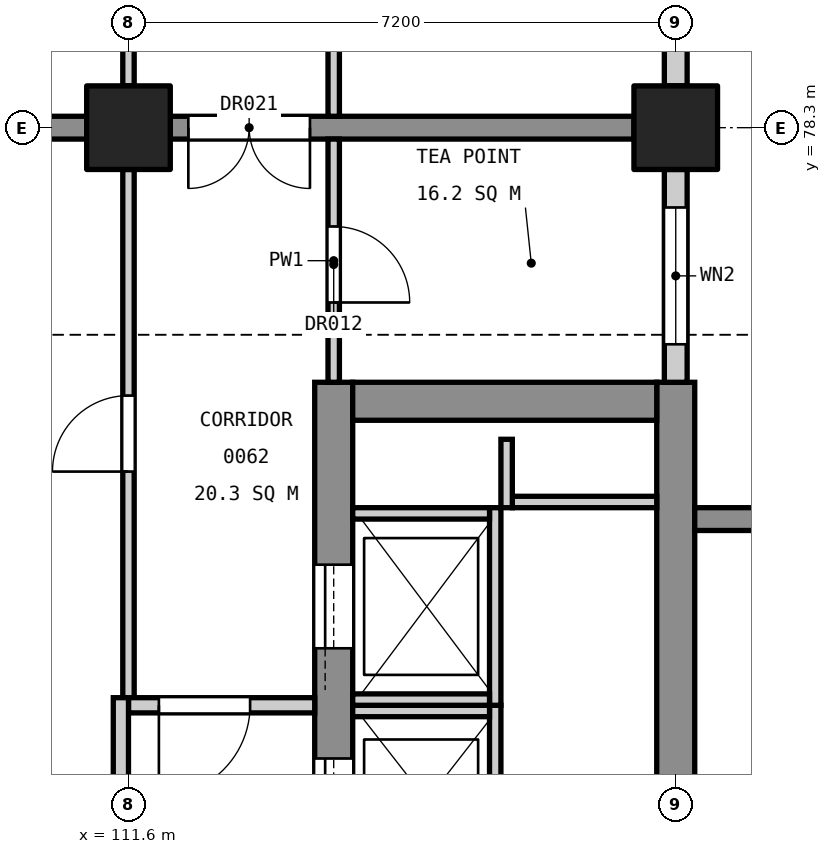
"""IFC4 building model, lengths in metres.
Left out: names, types, materials, properties, quantities, classifications, styles, units other than length and angle.
Written with IfcOpenShell. Run it as: python <this file> out.ifc"""

import sys

from ifc_helpers import new_model, si_unit, direction, frame, frame_2d, origin, origin_2d, place, context, subcontext, project, spatial, rectangle, extrude, element, fill, save


model = new_model("IFC4")
c1 = context("Model", 3, precision=1e-05, world=origin(), true_north=direction((0.0, 1.0)))
c2 = subcontext(c1, "Body", "Model", "MODEL_VIEW")
j1 = project(units=[si_unit("LENGTHUNIT", "METRE"), si_unit("PLANEANGLEUNIT", "RADIAN")], contexts=[c1])
p1 = place(None, origin())
s1 = spatial("IfcSite", under=j1, at=p1, CompositionType="ELEMENT")
p2 = place(p1, origin())
s2 = spatial("IfcBuilding", under=s1, at=p2, CompositionType="ELEMENT")
p3 = place(p2, origin())
s3 = spatial("IfcBuildingStorey", under=s2, at=p3, CompositionType="ELEMENT", Elevation=0.0)
for number, where, z_axis, x_axis in (
    (1, (118.8, 78.3, 0.0), (0.0, 0.0, 1.0), (1.0, 0.0, 0.0)),
    (2, (111.6, 78.3, 0.0), (0.0, 0.0, 1.0), (1.0, 0.0, 0.0)),
):
    element("IfcColumn", number, at=place(p3, frame(where, z_axis=z_axis, x_axis=x_axis)), inside=s3, PredefinedType="COLUMN", context=c2, shape_type="SweptSolid", body=[
        extrude(rectangle(XDim=1.1, YDim=1.1, at=origin_2d()), origin(), (0.0, 0.0, 1.0), 6.0),
    ])
p4 = place(p3, frame((118.8, 60.05, 0.0), z_axis=(0.0, 0.0, 1.0), x_axis=(0.0, 1.0, 0.0)))
e3 = element("IfcWall", 3, at=p4, inside=s3, PredefinedType="SHEAR", context=c2, shape_type="SweptSolid", body=[
    extrude(rectangle(XDim=14.9, YDim=0.5, at=frame_2d((7.45, 0.0))), origin(), (0.0, 0.0, 1.0), 5.7),
])
p5 = place(p4, frame((0.55, 0.0, 0.0)))
e4 = element("IfcOpeningElement", 4, at=p5, cuts=e3, PredefinedType="OPENING", context=c2, shape_type="SweptSolid", body=[
    extrude(rectangle(XDim=1.4, YDim=2.1, at=frame_2d((0.7, 1.05))), frame((0.0, 0.26, 0.0), z_axis=(0.0, -1.0, 0.0), x_axis=(1.0, 0.0, 0.0)), (0.0, 0.0, 1.0), 0.52),
])
p6 = place(p4, frame((6.58, 0.0, 3.4)))
e5 = element("IfcOpeningElement", 5, at=p6, cuts=e3, PredefinedType="OPENING", context=c2, shape_type="SweptSolid", body=[
    extrude(rectangle(XDim=1.2, YDim=0.9, at=frame_2d((0.6, 0.45))), frame((0.0, 0.26, 0.0), z_axis=(0.0, -1.0, 0.0), x_axis=(1.0, 0.0, 0.0)), (0.0, 0.0, 1.0), 0.52),
])
p7 = place(p3, frame((114.3, 60.05, 0.0), z_axis=(0.0, 0.0, 1.0), x_axis=(0.0, 1.0, 0.0)))
e6 = element("IfcWall", 6, at=p7, inside=s3, PredefinedType="SHEAR", context=c2, shape_type="SweptSolid", body=[
    extrude(rectangle(XDim=14.9, YDim=0.5, at=frame_2d((7.45, 0.0))), origin(), (0.0, 0.0, 1.0), 5.7),
])
p8 = place(p7, frame((0.55, 0.0, 0.0)))
e7 = element("IfcOpeningElement", 7, at=p8, cuts=e6, PredefinedType="OPENING", context=c2, shape_type="SweptSolid", body=[
    extrude(rectangle(XDim=1.4, YDim=2.1, at=frame_2d((0.7, 1.05))), frame((0.0, 0.26, 0.0), z_axis=(0.0, -1.0, 0.0), x_axis=(1.0, 0.0, 0.0)), (0.0, 0.0, 1.0), 0.52),
])
p9 = place(p7, frame((8.85, 0.0, 0.0)))
e8 = element("IfcOpeningElement", 8, at=p9, cuts=e6, PredefinedType="OPENING", context=c2, shape_type="SweptSolid", body=[
    extrude(rectangle(XDim=1.1, YDim=2.1, at=frame_2d((0.55, 1.05))), frame((0.0, 0.26, 0.0), z_axis=(0.0, -1.0, 0.0), x_axis=(1.0, 0.0, 0.0)), (0.0, 0.0, 1.0), 0.52),
])
p10 = place(p7, frame((11.4, 0.0, 0.0)))
e9 = element("IfcOpeningElement", 9, at=p10, cuts=e6, PredefinedType="OPENING", context=c2, shape_type="SweptSolid", body=[
    extrude(rectangle(XDim=1.1, YDim=2.1, at=frame_2d((0.55, 1.05))), frame((0.0, 0.26, 0.0), z_axis=(0.0, -1.0, 0.0), x_axis=(1.0, 0.0, 0.0)), (0.0, 0.0, 1.0), 0.52),
])
p11 = place(p3, frame((118.55, 74.7, 0.0), z_axis=(0.0, 0.0, 1.0), x_axis=(-1.0, 0.0, 0.0)))
e10 = element("IfcWall", 10, at=p11, inside=s3, PredefinedType="SHEAR", context=c2, shape_type="SweptSolid", body=[
    extrude(rectangle(XDim=4.0, YDim=0.5, at=frame_2d((2.0, 0.0))), origin(), (0.0, 0.0, 1.0), 5.7),
])
p12 = place(p3, frame((119.05, 73.15, 0.0), z_axis=(0.0, 0.0, 1.0), x_axis=(1.0, 0.0, 0.0)))
e11 = element("IfcWall", 11, at=p12, inside=s3, PredefinedType="SHEAR", context=c2, shape_type="SweptSolid", body=[
    extrude(rectangle(XDim=1.25, YDim=0.3, at=frame_2d((0.625, 0.0))), origin(), (0.0, 0.0, 1.0), 6.0),
])
p13 = place(p3, frame((118.25, 78.3, 0.0), z_axis=(0.0, 0.0, 1.0), x_axis=(-1.0, 0.0, 0.0)))
e12 = element("IfcWall", 12, at=p13, inside=s3, PredefinedType="SHEAR", context=c2, shape_type="SweptSolid", body=[
    extrude(rectangle(XDim=6.1, YDim=0.3, at=frame_2d((3.05, 0.0))), origin(), (0.0, 0.0, 1.0), 5.7),
])
p14 = place(p13, frame((4.262, 0.0, 0.0)))
e13 = element("IfcOpeningElement", 13, at=p14, cuts=e12, PredefinedType="OPENING", context=c2, shape_type="SweptSolid", body=[
    extrude(rectangle(XDim=1.6, YDim=2.1, at=frame_2d((0.8, 1.05))), frame((0.0, 0.16, 0.0), z_axis=(0.0, -1.0, 0.0), x_axis=(1.0, 0.0, 0.0)), (0.0, 0.0, 1.0), 0.32),
])
p15 = place(p3, frame((111.05, 78.3, 0.0), z_axis=(0.0, 0.0, 1.0), x_axis=(-1.0, 0.0, 0.0)))
e14 = element("IfcWall", 14, at=p15, inside=s3, PredefinedType="SHEAR", context=c2, shape_type="SweptSolid", body=[
    extrude(rectangle(XDim=9.7, YDim=0.3, at=frame_2d((4.85, 0.0))), origin(), (0.0, 0.0, 1.0), 5.7),
])
p16 = place(p3, frame((116.425, 68.2, 0.0), z_axis=(0.0, 0.0, 1.0), x_axis=(0.0, 1.0, 0.0)))
e15 = element("IfcWall", 15, at=p16, inside=s3, PredefinedType="SOLIDWALL", context=c2, shape_type="SweptSolid", body=[
    extrude(rectangle(XDim=2.5, YDim=0.15, at=frame_2d((1.25, 0.0))), origin(), (0.0, 0.0, 1.0), 6.0),
])
p17 = place(p3, frame((116.35, 70.625, 0.0), z_axis=(0.0, 0.0, 1.0), x_axis=(-1.0, 0.0, 0.0)))
e16 = element("IfcWall", 16, at=p17, inside=s3, PredefinedType="SOLIDWALL", context=c2, shape_type="SweptSolid", body=[
    extrude(rectangle(XDim=1.8, YDim=0.15, at=frame_2d((0.9, 0.0))), origin(), (0.0, 0.0, 1.0), 6.0),
])
p18 = place(p3, frame((116.425, 70.7, 0.0), z_axis=(0.0, 0.0, 1.0), x_axis=(0.0, 1.0, 0.0)))
e17 = element("IfcWall", 17, at=p18, inside=s3, PredefinedType="SOLIDWALL", context=c2, shape_type="SweptSolid", body=[
    extrude(rectangle(XDim=2.6, YDim=0.15, at=frame_2d((1.3, 0.0))), origin(), (0.0, 0.0, 1.0), 6.0),
])
for number, where, z_axis, x_axis in (
    (18, (116.35, 70.775, 0.0), (0.0, 0.0, 1.0), (-1.0, 0.0, 0.0)),
    (19, (116.35, 73.225, 0.0), (0.0, 0.0, 1.0), (-1.0, 0.0, 0.0)),
):
    element("IfcWall", number, at=place(p3, frame(where, z_axis=z_axis, x_axis=x_axis)), inside=s3, PredefinedType="SOLIDWALL", context=c2, shape_type="SweptSolid", body=[
        extrude(rectangle(XDim=1.8, YDim=0.15, at=frame_2d((0.9, 0.0))), origin(), (0.0, 0.0, 1.0), 6.0),
    ])
p19 = place(p3, frame((118.55, 73.375, 0.0), z_axis=(0.0, 0.0, 1.0), x_axis=(-1.0, 0.0, 0.0)))
e20 = element("IfcWall", 20, at=p19, inside=s3, PredefinedType="SOLIDWALL", context=c2, shape_type="SweptSolid", body=[
    extrude(rectangle(XDim=1.9, YDim=0.15, at=frame_2d((0.95, 0.0))), origin(), (0.0, 0.0, 1.0), 6.0),
])
p20 = place(p3, frame((116.575, 73.3, 0.0), z_axis=(0.0, 0.0, 1.0), x_axis=(0.0, 1.0, 0.0)))
e21 = element("IfcWall", 21, at=p20, inside=s3, PredefinedType="SOLIDWALL", context=c2, shape_type="SweptSolid", body=[
    extrude(rectangle(XDim=0.9, YDim=0.15, at=frame_2d((0.45, 0.0))), origin(), (0.0, 0.0, 1.0), 6.0),
])
p21 = place(p3, frame((118.8, 74.95, 0.0), z_axis=(0.0, 0.0, 1.0), x_axis=(0.0, 1.0, 0.0)))
e22 = element("IfcWall", 22, at=p21, inside=s3, PredefinedType="STANDARD", context=c2, shape_type="SweptSolid", body=[
    extrude(rectangle(XDim=2.8, YDim=0.3, at=frame_2d((1.4, 0.0))), origin(), (0.0, 0.0, 1.0), 4.7),
])
p22 = place(p21, frame((0.5, 0.0, 0.9)))
e23 = element("IfcOpeningElement", 23, at=p22, cuts=e22, PredefinedType="OPENING", context=c2, shape_type="SweptSolid", body=[
    extrude(rectangle(XDim=1.8, YDim=3.0, at=frame_2d((0.9, 1.5))), frame((0.0, 0.16, 0.0), z_axis=(0.0, -1.0, 0.0), x_axis=(1.0, 0.0, 0.0)), (0.0, 0.0, 1.0), 0.32),
])
p23 = place(p3, frame((118.8, 78.85, 0.0), z_axis=(0.0, 0.0, 1.0), x_axis=(0.0, 1.0, 0.0)))
e24 = element("IfcWall", 24, at=p23, inside=s3, PredefinedType="STANDARD", context=c2, shape_type="SweptSolid", body=[
    extrude(rectangle(XDim=10.0, YDim=0.3, at=frame_2d((5.0, 0.0))), origin(), (0.0, 0.0, 1.0), 4.7),
])
p24 = place(p23, frame((0.625, 0.0, 0.9)))
e25 = element("IfcOpeningElement", 25, at=p24, cuts=e24, PredefinedType="OPENING", context=c2, shape_type="SweptSolid", body=[
    extrude(rectangle(XDim=1.8, YDim=3.0, at=frame_2d((0.9, 1.5))), frame((0.0, 0.16, 0.0), z_axis=(0.0, -1.0, 0.0), x_axis=(1.0, 0.0, 0.0)), (0.0, 0.0, 1.0), 0.32),
])
p25 = place(p23, frame((3.95, 0.0, 0.9)))
e26 = element("IfcOpeningElement", 26, at=p25, cuts=e24, PredefinedType="OPENING", context=c2, shape_type="SweptSolid", body=[
    extrude(rectangle(XDim=1.8, YDim=3.0, at=frame_2d((0.9, 1.5))), frame((0.0, 0.16, 0.0), z_axis=(0.0, -1.0, 0.0), x_axis=(1.0, 0.0, 0.0)), (0.0, 0.0, 1.0), 0.32),
])
p26 = place(p23, frame((7.425, 0.0, 0.9)))
e27 = element("IfcOpeningElement", 27, at=p26, cuts=e24, PredefinedType="OPENING", context=c2, shape_type="SweptSolid", body=[
    extrude(rectangle(XDim=1.8, YDim=3.0, at=frame_2d((0.9, 1.5))), frame((0.0, 0.16, 0.0), z_axis=(0.0, -1.0, 0.0), x_axis=(1.0, 0.0, 0.0)), (0.0, 0.0, 1.0), 0.32),
])
p27 = place(p3, frame((114.3, 74.95, 0.0), z_axis=(0.0, 0.0, 1.0), x_axis=(0.0, 1.0, 0.0)))
e28 = element("IfcWall", 28, at=p27, inside=s3, PredefinedType="PARTITIONING", context=c2, shape_type="SweptSolid", body=[
    extrude(rectangle(XDim=3.2, YDim=0.15, at=frame_2d((1.6, 0.0))), origin(), (0.0, 0.0, 1.0), 4.6),
])
p28 = place(p27, frame((1.05, 0.0, 0.0)))
e29 = element("IfcOpeningElement", 29, at=p28, cuts=e28, PredefinedType="OPENING", context=c2, shape_type="SweptSolid", body=[
    extrude(rectangle(XDim=1.0, YDim=2.1, at=frame_2d((0.5, 1.05))), frame((0.0, 0.085, 0.0), z_axis=(0.0, -1.0, 0.0), x_axis=(1.0, 0.0, 0.0)), (0.0, 0.0, 1.0), 0.17),
])
p29 = place(p3, frame((114.3, 78.45, 0.0), z_axis=(0.0, 0.0, 1.0), x_axis=(0.0, 1.0, 0.0)))
e30 = element("IfcWall", 30, at=p29, inside=s3, PredefinedType="PARTITIONING", context=c2, shape_type="SweptSolid", body=[
    extrude(rectangle(XDim=10.4, YDim=0.15, at=frame_2d((5.2, 0.0))), origin(), (0.0, 0.0, 1.0), 4.6),
])
p30 = place(p29, frame((4.65, 0.0, 0.0)))
e31 = element("IfcOpeningElement", 31, at=p30, cuts=e30, PredefinedType="OPENING", context=c2, shape_type="SweptSolid", body=[
    extrude(rectangle(XDim=1.2, YDim=2.1, at=frame_2d((0.6, 1.05))), frame((0.0, 0.085, 0.0), z_axis=(0.0, -1.0, 0.0), x_axis=(1.0, 0.0, 0.0)), (0.0, 0.0, 1.0), 0.17),
])
p31 = place(p3, frame((111.6, 70.8, 0.0), z_axis=(0.0, 0.0, 1.0), x_axis=(0.0, 1.0, 0.0)))
e32 = element("IfcWall", 32, at=p31, inside=s3, PredefinedType="PARTITIONING", context=c2, shape_type="SweptSolid", body=[
    extrude(rectangle(XDim=6.95, YDim=0.15, at=frame_2d((3.475, 0.0))), origin(), (0.0, 0.0, 1.0), 4.6),
])
p32 = place(p31, frame((2.975, 0.0, 0.0)))
e33 = element("IfcOpeningElement", 33, at=p32, cuts=e32, PredefinedType="OPENING", context=c2, shape_type="SweptSolid", body=[
    extrude(rectangle(XDim=1.0, YDim=2.1, at=frame_2d((0.5, 1.05))), frame((0.0, 0.085, 0.0), z_axis=(0.0, -1.0, 0.0), x_axis=(1.0, 0.0, 0.0)), (0.0, 0.0, 1.0), 0.17),
])
p33 = place(p3, frame((111.6, 78.85, 0.0), z_axis=(0.0, 0.0, 1.0), x_axis=(0.0, 1.0, 0.0)))
e34 = element("IfcWall", 34, at=p33, inside=s3, PredefinedType="PARTITIONING", context=c2, shape_type="SweptSolid", body=[
    extrude(rectangle(XDim=9.7, YDim=0.15, at=frame_2d((4.85, 0.0))), origin(), (0.0, 0.0, 1.0), 4.6),
])
p34 = place(p33, frame((2.725, 0.0, 0.0)))
e35 = element("IfcOpeningElement", 35, at=p34, cuts=e34, PredefinedType="OPENING", context=c2, shape_type="SweptSolid", body=[
    extrude(rectangle(XDim=1.2, YDim=2.1, at=frame_2d((0.6, 1.05))), frame((0.0, 0.085, 0.0), z_axis=(0.0, -1.0, 0.0), x_axis=(1.0, 0.0, 0.0)), (0.0, 0.0, 1.0), 0.17),
])
p35 = place(p33, frame((7.575, 0.0, 0.0)))
e36 = element("IfcOpeningElement", 36, at=p35, cuts=e34, PredefinedType="OPENING", context=c2, shape_type="SweptSolid", body=[
    extrude(rectangle(XDim=1.2, YDim=2.1, at=frame_2d((0.6, 1.05))), frame((0.0, 0.085, 0.0), z_axis=(0.0, -1.0, 0.0), x_axis=(1.0, 0.0, 0.0)), (0.0, 0.0, 1.0), 0.17),
])
p36 = place(p3, frame((114.05, 70.7, 0.0), z_axis=(0.0, 0.0, 1.0), x_axis=(-1.0, 0.0, 0.0)))
e37 = element("IfcWall", 37, at=p36, inside=s3, PredefinedType="PARTITIONING", context=c2, shape_type="SweptSolid", body=[
    extrude(rectangle(XDim=2.45, YDim=0.2, at=frame_2d((1.225, 0.0))), origin(), (0.0, 0.0, 1.0), 4.6),
])
p37 = place(p36, frame((0.85, 0.0, 0.0)))
e38 = element("IfcOpeningElement", 38, at=p37, cuts=e37, PredefinedType="OPENING", context=c2, shape_type="SweptSolid", body=[
    extrude(rectangle(XDim=1.2, YDim=2.1, at=frame_2d((0.6, 1.05))), frame((0.0, 0.11, 0.0), z_axis=(0.0, -1.0, 0.0), x_axis=(1.0, 0.0, 0.0)), (0.0, 0.0, 1.0), 0.22),
])
p38 = place(p3, frame((111.5, 68.05, 0.0), z_axis=(0.0, 0.0, 1.0), x_axis=(0.0, 1.0, 0.0)))
e39 = element("IfcWall", 39, at=p38, inside=s3, PredefinedType="PARTITIONING", context=c2, shape_type="SweptSolid", body=[
    extrude(rectangle(XDim=2.75, YDim=0.2, at=frame_2d((1.375, 0.0))), origin(), (0.0, 0.0, 1.0), 4.6),
])
p39 = place(p9, origin())
e40 = element("IfcDoor", 40, at=p39, inside=s3, OperationType="SLIDING_TO_LEFT", PredefinedType="DOOR", context=c2, shape_type="SweptSolid", body=[
    extrude(rectangle(XDim=1.1, YDim=2.1, at=frame_2d((0.55, 1.05))), frame((0.0, 0.025, 0.0), z_axis=(0.0, -1.0, 0.0), x_axis=(1.0, 0.0, 0.0)), (0.0, 0.0, 1.0), 0.05),
])
fill(e8, e40)
p40 = place(p10, origin())
e41 = element("IfcDoor", 41, at=p40, inside=s3, OperationType="SLIDING_TO_LEFT", PredefinedType="DOOR", context=c2, shape_type="SweptSolid", body=[
    extrude(rectangle(XDim=1.1, YDim=2.1, at=frame_2d((0.55, 1.05))), frame((0.0, 0.025, 0.0), z_axis=(0.0, -1.0, 0.0), x_axis=(1.0, 0.0, 0.0)), (0.0, 0.0, 1.0), 0.05),
])
fill(e9, e41)
p41 = place(p22, origin())
e42 = element("IfcWindow", 42, at=p41, inside=s3, PartitioningType="SINGLE_PANEL", PredefinedType="WINDOW", context=c2, shape_type="SweptSolid", body=[
    extrude(rectangle(XDim=1.8, YDim=3.0, at=frame_2d((0.9, 1.5))), frame((0.0, 0.03, 0.0), z_axis=(0.0, -1.0, 0.0), x_axis=(1.0, 0.0, 0.0)), (0.0, 0.0, 1.0), 0.06),
])
fill(e23, e42)
p42 = place(p32, origin())
e43 = element("IfcDoor", 43, at=p42, inside=s3, OperationType="SINGLE_SWING_LEFT", PredefinedType="DOOR", context=c2, shape_type="SweptSolid", body=[
    extrude(rectangle(XDim=1.0, YDim=2.1, at=frame_2d((0.5, 1.05))), frame((0.0, 0.025, 0.0), z_axis=(0.0, -1.0, 0.0), x_axis=(1.0, 0.0, 0.0)), (0.0, 0.0, 1.0), 0.05),
])
fill(e33, e43)
p43 = place(p28, frame((1.0, 0.0, 0.0), z_axis=(0.0, 0.0, 1.0), x_axis=(-1.0, 0.0, 0.0)))
e44 = element("IfcDoor", 44, at=p43, inside=s3, OperationType="SINGLE_SWING_RIGHT", PredefinedType="DOOR", context=c2, shape_type="SweptSolid", body=[
    extrude(rectangle(XDim=1.0, YDim=2.1, at=frame_2d((0.5, 1.05))), frame((0.0, 0.025, 0.0), z_axis=(0.0, -1.0, 0.0), x_axis=(1.0, 0.0, 0.0)), (0.0, 0.0, 1.0), 0.05),
])
fill(e29, e44)
p44 = place(p37, origin())
e45 = element("IfcDoor", 45, at=p44, inside=s3, OperationType="SINGLE_SWING_RIGHT", PredefinedType="DOOR", context=c2, shape_type="SweptSolid", body=[
    extrude(rectangle(XDim=1.2, YDim=2.1, at=frame_2d((0.6, 1.05))), frame((0.0, 0.025, 0.0), z_axis=(0.0, -1.0, 0.0), x_axis=(1.0, 0.0, 0.0)), (0.0, 0.0, 1.0), 0.05),
])
fill(e38, e45)
p45 = place(p14, origin())
e46 = element("IfcDoor", 46, at=p45, inside=s3, OperationType="DOUBLE_DOOR_SINGLE_SWING", PredefinedType="DOOR", context=c2, shape_type="SweptSolid", body=[
    extrude(rectangle(XDim=1.6, YDim=2.1, at=frame_2d((0.8, 1.05))), frame((0.0, 0.025, 0.0), z_axis=(0.0, -1.0, 0.0), x_axis=(1.0, 0.0, 0.0)), (0.0, 0.0, 1.0), 0.05),
])
fill(e13, e46)
save(model, sys.argv[1])
